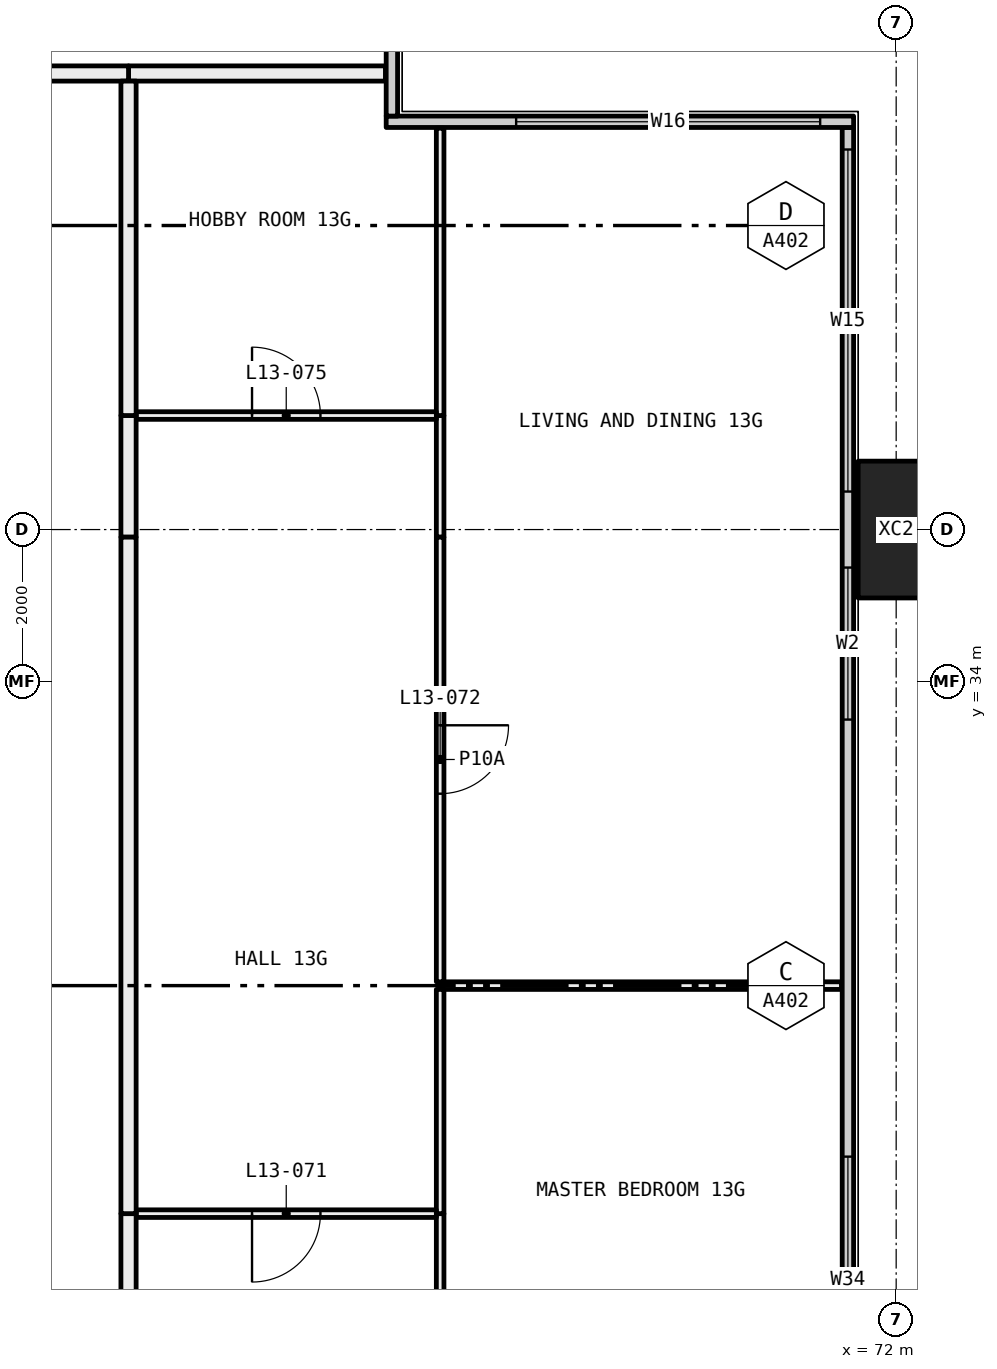
"""IFC4 building model, lengths in metres.
Left out: names, types, materials, properties, quantities, classifications, styles, units other than length and angle.
Written with IfcOpenShell. Run it as: python <this file> out.ifc"""

import sys

from ifc_helpers import new_model, si_unit, direction, frame, frame_2d, origin, origin_2d, place, context, subcontext, project, spatial, rectangle, hollow_rectangle, extrude, element, fill, save


model = new_model("IFC4")
c1 = context("Model", 3, precision=1e-05, world=origin(), true_north=direction((0.0, 1.0)))
c2 = subcontext(c1, "Body", "Model", "MODEL_VIEW")
j1 = project(units=[si_unit("LENGTHUNIT", "METRE"), si_unit("PLANEANGLEUNIT", "RADIAN")], contexts=[c1])
p1 = place(None, origin())
s1 = spatial("IfcSite", under=j1, at=p1, CompositionType="ELEMENT")
p2 = place(p1, origin())
s2 = spatial("IfcBuilding", under=s1, at=p2, CompositionType="ELEMENT")
p3 = place(p2, frame((0.0, 0.0, 57.6)))
s3 = spatial("IfcBuildingStorey", under=s2, at=p3, CompositionType="ELEMENT", Elevation=57.6)
p4 = place(p3, frame((72.0, 36.0, -0.4), z_axis=(0.0, 0.0, 1.0), x_axis=(0.0, 1.0, 0.0)))
e1 = element("IfcColumn", 1, at=p4, inside=s3, PredefinedType="COLUMN", context=c2, shape_type="SweptSolid", body=[
    extrude(hollow_rectangle(XDim=1.8, YDim=1.0, WallThickness=0.07, at=origin_2d()), origin(), (0.0, 0.0, 1.0), 3.45),
])
p5 = place(p3, frame((71.365, 6.71, 0.0), z_axis=(0.0, 0.0, 1.0), x_axis=(0.0, 1.0, 0.0)))
e2 = element("IfcWall", 2, at=p5, inside=s3, PredefinedType="ELEMENTEDWALL", context=c2, shape_type="SweptSolid", body=[
    extrude(rectangle(XDim=34.58, YDim=0.15, at=frame_2d((17.29, 0.0))), origin(), (0.0, 0.0, 1.0), 3.05),
])
p6 = place(p5, frame((0.29, 0.0, 0.45)))
e3 = element("IfcOpeningElement", 3, at=p6, cuts=e2, PredefinedType="OPENING", context=c2, shape_type="SweptSolid", body=[
    extrude(rectangle(XDim=4.5, YDim=2.55, at=frame_2d((2.25, 1.275))), frame((0.0, 0.085, 0.0), z_axis=(0.0, -1.0, 0.0), x_axis=(1.0, 0.0, 0.0)), (0.0, 0.0, 1.0), 0.17),
])
p7 = place(p5, frame((5.79, 0.0, 0.45)))
e4 = element("IfcOpeningElement", 4, at=p7, cuts=e2, PredefinedType="OPENING", context=c2, shape_type="SweptSolid", body=[
    extrude(rectangle(XDim=3.25, YDim=2.55, at=frame_2d((1.625, 1.275))), frame((0.0, 0.085, 0.0), z_axis=(0.0, -1.0, 0.0), x_axis=(1.0, 0.0, 0.0)), (0.0, 0.0, 1.0), 0.17),
])
p8 = place(p5, frame((13.54, 0.0, 0.45)))
e5 = element("IfcOpeningElement", 5, at=p8, cuts=e2, PredefinedType="OPENING", context=c2, shape_type="SweptSolid", body=[
    extrude(rectangle(XDim=3.25, YDim=2.55, at=frame_2d((1.625, 1.275))), frame((0.0, 0.085, 0.0), z_axis=(0.0, -1.0, 0.0), x_axis=(1.0, 0.0, 0.0)), (0.0, 0.0, 1.0), 0.17),
])
p9 = place(p5, frame((17.79, 0.0, 0.45)))
e6 = element("IfcOpeningElement", 6, at=p9, cuts=e2, PredefinedType="OPENING", context=c2, shape_type="SweptSolid", body=[
    extrude(rectangle(XDim=3.25, YDim=2.55, at=frame_2d((1.625, 1.275))), frame((0.0, 0.085, 0.0), z_axis=(0.0, -1.0, 0.0), x_axis=(1.0, 0.0, 0.0)), (0.0, 0.0, 1.0), 0.17),
])
p10 = place(p5, frame((26.79, 0.0, 0.45)))
e7 = element("IfcOpeningElement", 7, at=p10, cuts=e2, PredefinedType="OPENING", context=c2, shape_type="SweptSolid", body=[
    extrude(rectangle(XDim=2.0, YDim=2.55, at=frame_2d((1.0, 1.275))), frame((0.0, 0.085, 0.0), z_axis=(0.0, -1.0, 0.0), x_axis=(1.0, 0.0, 0.0)), (0.0, 0.0, 1.0), 0.17),
])
p11 = place(p5, frame((29.79, 0.0, 0.45)))
e8 = element("IfcOpeningElement", 8, at=p11, cuts=e2, PredefinedType="OPENING", context=c2, shape_type="SweptSolid", body=[
    extrude(rectangle(XDim=4.5, YDim=2.55, at=frame_2d((2.25, 1.275))), frame((0.0, 0.085, 0.0), z_axis=(0.0, -1.0, 0.0), x_axis=(1.0, 0.0, 0.0)), (0.0, 0.0, 1.0), 0.17),
])
p12 = place(p3, frame((65.29, 41.365, 0.0), z_axis=(0.0, 0.0, 1.0), x_axis=(1.0, 0.0, 0.0)))
e9 = element("IfcWall", 9, at=p12, inside=s3, PredefinedType="ELEMENTEDWALL", context=c2, shape_type="SweptSolid", body=[
    extrude(rectangle(XDim=6.15, YDim=0.15, at=frame_2d((3.075, 0.0))), origin(), (0.0, 0.0, 1.0), 3.05),
])
p13 = place(p12, frame((1.71, 0.0, 0.45)))
e10 = element("IfcOpeningElement", 10, at=p13, cuts=e9, PredefinedType="OPENING", context=c2, shape_type="SweptSolid", body=[
    extrude(rectangle(XDim=4.0, YDim=2.55, at=frame_2d((2.0, 1.275))), frame((0.0, 0.085, 0.0), z_axis=(0.0, -1.0, 0.0), x_axis=(1.0, 0.0, 0.0)), (0.0, 0.0, 1.0), 0.17),
])
p14 = place(p3, frame((65.365, 41.44, 0.0), z_axis=(0.0, 0.0, 1.0), x_axis=(0.0, 1.0, 0.0)))
e11 = element("IfcWall", 11, at=p14, inside=s3, PredefinedType="ELEMENTEDWALL", context=c2, shape_type="SweptSolid", body=[
    extrude(rectangle(XDim=5.85, YDim=0.15, at=frame_2d((2.925, 0.0))), origin(), (0.0, 0.0, 1.0), 3.05),
])
p15 = place(p14, frame((1.56, 0.0, 0.45)))
e12 = element("IfcOpeningElement", 12, at=p15, cuts=e11, PredefinedType="OPENING", context=c2, shape_type="SweptSolid", body=[
    extrude(rectangle(XDim=4.0, YDim=2.55, at=frame_2d((2.0, 1.275))), frame((0.0, 0.085, 0.0), z_axis=(0.0, -1.0, 0.0), x_axis=(1.0, 0.0, 0.0)), (0.0, 0.0, 1.0), 0.17),
])
p16 = place(p3, frame((61.9, 42.0, 0.0), z_axis=(0.0, 0.0, 1.0), x_axis=(1.0, 0.0, 0.0)))
e13 = element("IfcWall", 13, at=p16, inside=s3, PredefinedType="PARTITIONING", context=c2, shape_type="SweptSolid", body=[
    extrude(rectangle(XDim=3.38, YDim=0.2, at=frame_2d((1.69, 0.0))), origin(), (0.0, 0.0, 1.0), 3.05),
])
p17 = place(p3, frame((60.0, 42.0, 0.0), z_axis=(0.0, 0.0, 1.0), x_axis=(1.0, 0.0, 0.0)))
e14 = element("IfcWall", 14, at=p17, inside=s3, PredefinedType="PARTITIONING", context=c2, shape_type="SweptSolid", body=[
    extrude(rectangle(XDim=1.9, YDim=0.2, at=frame_2d((0.95, 0.0))), origin(), (0.0, 0.0, 1.0), 3.05),
])
p18 = place(p3, frame((71.28, 30.0, 0.0), z_axis=(0.0, 0.0, 1.0), x_axis=(-1.0, 0.0, 0.0)))
e15 = element("IfcWall", 15, at=p18, inside=s3, PredefinedType="PARTITIONING", context=c2, shape_type="SweptSolid", body=[
    extrude(rectangle(XDim=5.28, YDim=0.1, at=frame_2d((2.64, 0.0))), origin(), (0.0, 0.0, 1.0), 3.05),
])
p19 = place(p3, frame((66.0, 27.0, 0.0), z_axis=(0.0, 0.0, 1.0), x_axis=(0.0, -1.0, 0.0)))
e16 = element("IfcWall", 16, at=p19, inside=s3, PredefinedType="PARTITIONING", context=c2, shape_type="SweptSolid", body=[
    extrude(rectangle(XDim=2.95, YDim=0.1, at=frame_2d((1.475, 0.0))), origin(), (0.0, 0.0, 1.0), 2.45),
])
p20 = place(p3, frame((66.0, 29.95, 0.0), z_axis=(0.0, 0.0, 1.0), x_axis=(0.0, -1.0, 0.0)))
e17 = element("IfcWall", 17, at=p20, inside=s3, PredefinedType="PARTITIONING", context=c2, shape_type="SweptSolid", body=[
    extrude(rectangle(XDim=2.95, YDim=0.1, at=frame_2d((1.475, 0.0))), origin(), (0.0, 0.0, 1.0), 3.05),
])
p21 = place(p3, frame((66.0, 37.5, 0.0), z_axis=(0.0, 0.0, 1.0), x_axis=(0.0, -1.0, 0.0)))
e18 = element("IfcWall", 18, at=p21, inside=s3, PredefinedType="PARTITIONING", context=c2, shape_type="SweptSolid", body=[
    extrude(rectangle(XDim=1.6, YDim=0.1, at=frame_2d((0.8, 0.0))), origin(), (0.0, 0.0, 1.0), 2.45),
])
p22 = place(p3, frame((66.0, 35.9, 0.0), z_axis=(0.0, 0.0, 1.0), x_axis=(0.0, -1.0, 0.0)))
e19 = element("IfcWall", 19, at=p22, inside=s3, PredefinedType="PARTITIONING", context=c2, shape_type="SweptSolid", body=[
    extrude(rectangle(XDim=5.85, YDim=0.1, at=frame_2d((2.925, 0.0))), origin(), (0.0, 0.0, 1.0), 3.05),
])
p23 = place(p22, frame((2.475, 0.0, 0.0)))
e20 = element("IfcOpeningElement", 20, at=p23, cuts=e19, PredefinedType="OPENING", context=c2, shape_type="SweptSolid", body=[
    extrude(rectangle(XDim=0.9, YDim=2.1, at=frame_2d((0.45, 1.05))), frame((0.0, 0.06, 0.0), z_axis=(0.0, -1.0, 0.0), x_axis=(1.0, 0.0, 0.0)), (0.0, 0.0, 1.0), 0.12),
])
p24 = place(p3, frame((66.0, 41.28, 0.0), z_axis=(0.0, 0.0, 1.0), x_axis=(0.0, -1.0, 0.0)))
e21 = element("IfcWall", 21, at=p24, inside=s3, PredefinedType="PARTITIONING", context=c2, shape_type="SweptSolid", body=[
    extrude(rectangle(XDim=3.78, YDim=0.1, at=frame_2d((1.89, 0.0))), origin(), (0.0, 0.0, 1.0), 3.05),
])
p25 = place(p3, frame((65.95, 27.0, 0.0), z_axis=(0.0, 0.0, 1.0), x_axis=(-1.0, 0.0, 0.0)))
e22 = element("IfcWall", 22, at=p25, inside=s3, PredefinedType="PARTITIONING", context=c2, shape_type="SweptSolid", body=[
    extrude(rectangle(XDim=3.95, YDim=0.1, at=frame_2d((1.975, 0.0))), origin(), (0.0, 0.0, 1.0), 3.05),
])
p26 = place(p25, frame((1.525, 0.0, 0.0)))
e23 = element("IfcOpeningElement", 23, at=p26, cuts=e22, PredefinedType="OPENING", context=c2, shape_type="SweptSolid", body=[
    extrude(rectangle(XDim=0.9, YDim=2.1, at=frame_2d((0.45, 1.05))), frame((0.0, 0.06, 0.0), z_axis=(0.0, -1.0, 0.0), x_axis=(1.0, 0.0, 0.0)), (0.0, 0.0, 1.0), 0.12),
])
p27 = place(p3, frame((61.9, 27.0, 0.0), z_axis=(0.0, 0.0, 1.0), x_axis=(0.0, -1.0, 0.0)))
e24 = element("IfcWall", 24, at=p27, inside=s3, PredefinedType="PARTITIONING", context=c2, shape_type="SweptSolid", body=[
    extrude(rectangle(XDim=3.1, YDim=0.2, at=frame_2d((1.55, 0.0))), origin(), (0.0, 0.0, 1.0), 2.45),
])
p28 = place(p27, frame((1.05, 0.0, 0.0)))
e25 = element("IfcOpeningElement", 25, at=p28, cuts=e24, PredefinedType="OPENING", context=c2, shape_type="SweptSolid", body=[
    extrude(rectangle(XDim=1.0, YDim=2.1, at=frame_2d((0.5, 1.05))), frame((0.0, 0.11, 0.0), z_axis=(0.0, -1.0, 0.0), x_axis=(1.0, 0.0, 0.0)), (0.0, 0.0, 1.0), 0.22),
])
p29 = place(p3, frame((65.95, 37.5, 0.0), z_axis=(0.0, 0.0, 1.0), x_axis=(-1.0, 0.0, 0.0)))
e26 = element("IfcWall", 26, at=p29, inside=s3, PredefinedType="PARTITIONING", context=c2, shape_type="SweptSolid", body=[
    extrude(rectangle(XDim=3.95, YDim=0.1, at=frame_2d((1.975, 0.0))), origin(), (0.0, 0.0, 1.0), 3.05),
])
p30 = place(p29, frame((1.525, 0.0, 0.0)))
e27 = element("IfcOpeningElement", 27, at=p30, cuts=e26, PredefinedType="OPENING", context=c2, shape_type="SweptSolid", body=[
    extrude(rectangle(XDim=0.9, YDim=2.1, at=frame_2d((0.45, 1.05))), frame((0.0, 0.06, 0.0), z_axis=(0.0, -1.0, 0.0), x_axis=(1.0, 0.0, 0.0)), (0.0, 0.0, 1.0), 0.12),
])
p31 = place(p3, frame((61.9, 37.5, 0.0), z_axis=(0.0, 0.0, 1.0), x_axis=(0.0, -1.0, 0.0)))
e28 = element("IfcWall", 28, at=p31, inside=s3, PredefinedType="PARTITIONING", context=c2, shape_type="SweptSolid", body=[
    extrude(rectangle(XDim=1.6, YDim=0.2, at=frame_2d((0.8, 0.0))), origin(), (0.0, 0.0, 1.0), 2.45),
])
p32 = place(p3, frame((61.9, 35.9, 0.0), z_axis=(0.0, 0.0, 1.0), x_axis=(0.0, -1.0, 0.0)))
e29 = element("IfcWall", 29, at=p32, inside=s3, PredefinedType="PARTITIONING", context=c2, shape_type="SweptSolid", body=[
    extrude(rectangle(XDim=8.9, YDim=0.2, at=frame_2d((4.45, 0.0))), origin(), (0.0, 0.0, 1.0), 3.05),
])
p33 = place(p3, frame((61.9, 41.9, 0.0), z_axis=(0.0, 0.0, 1.0), x_axis=(0.0, -1.0, 0.0)))
e30 = element("IfcWall", 30, at=p33, inside=s3, PredefinedType="PARTITIONING", context=c2, shape_type="SweptSolid", body=[
    extrude(rectangle(XDim=4.4, YDim=0.2, at=frame_2d((2.2, 0.0))), origin(), (0.0, 0.0, 1.0), 3.05),
])
p34 = place(p9, origin())
e31 = element("IfcWindow", 31, at=p34, inside=s3, PartitioningType="SINGLE_PANEL", PredefinedType="WINDOW", context=c2, shape_type="SweptSolid", body=[
    extrude(rectangle(XDim=3.25, YDim=2.55, at=frame_2d((1.625, 1.275))), frame((0.0, 0.03, 0.0), z_axis=(0.0, -1.0, 0.0), x_axis=(1.0, 0.0, 0.0)), (0.0, 0.0, 1.0), 0.06),
])
fill(e6, e31)
p35 = place(p10, origin())
e32 = element("IfcWindow", 32, at=p35, inside=s3, PartitioningType="SINGLE_PANEL", PredefinedType="WINDOW", context=c2, shape_type="SweptSolid", body=[
    extrude(rectangle(XDim=2.0, YDim=2.55, at=frame_2d((1.0, 1.275))), frame((0.0, 0.03, 0.0), z_axis=(0.0, -1.0, 0.0), x_axis=(1.0, 0.0, 0.0)), (0.0, 0.0, 1.0), 0.06),
])
fill(e7, e32)
p36 = place(p11, origin())
e33 = element("IfcWindow", 33, at=p36, inside=s3, PartitioningType="SINGLE_PANEL", PredefinedType="WINDOW", context=c2, shape_type="SweptSolid", body=[
    extrude(rectangle(XDim=4.5, YDim=2.55, at=frame_2d((2.25, 1.275))), frame((0.0, 0.03, 0.0), z_axis=(0.0, -1.0, 0.0), x_axis=(1.0, 0.0, 0.0)), (0.0, 0.0, 1.0), 0.06),
])
fill(e8, e33)
p37 = place(p13, origin())
e34 = element("IfcWindow", 34, at=p37, inside=s3, PartitioningType="SINGLE_PANEL", PredefinedType="WINDOW", context=c2, shape_type="SweptSolid", body=[
    extrude(rectangle(XDim=4.0, YDim=2.55, at=frame_2d((2.0, 1.275))), frame((0.0, 0.03, 0.0), z_axis=(0.0, -1.0, 0.0), x_axis=(1.0, 0.0, 0.0)), (0.0, 0.0, 1.0), 0.06),
])
fill(e10, e34)
p38 = place(p26, origin())
e35 = element("IfcDoor", 35, at=p38, inside=s3, OperationType="SINGLE_SWING_LEFT", PredefinedType="DOOR", context=c2, shape_type="SweptSolid", body=[
    extrude(rectangle(XDim=0.9, YDim=2.1, at=frame_2d((0.45, 1.05))), frame((0.0, 0.025, 0.0), z_axis=(0.0, -1.0, 0.0), x_axis=(1.0, 0.0, 0.0)), (0.0, 0.0, 1.0), 0.05),
])
fill(e23, e35)
p39 = place(p23, origin())
e36 = element("IfcDoor", 36, at=p39, inside=s3, OperationType="SINGLE_SWING_RIGHT", PredefinedType="DOOR", context=c2, shape_type="SweptSolid", body=[
    extrude(rectangle(XDim=0.9, YDim=2.1, at=frame_2d((0.45, 1.05))), frame((0.0, 0.025, 0.0), z_axis=(0.0, -1.0, 0.0), x_axis=(1.0, 0.0, 0.0)), (0.0, 0.0, 1.0), 0.05),
])
fill(e20, e36)
p40 = place(p30, frame((0.9, 0.0, 0.0), x_axis=(-1.0, 0.0, 0.0)))
e37 = element("IfcDoor", 37, at=p40, inside=s3, OperationType="SINGLE_SWING_RIGHT", PredefinedType="DOOR", context=c2, shape_type="SweptSolid", body=[
    extrude(rectangle(XDim=0.9, YDim=2.1, at=frame_2d((0.45, 1.05))), frame((0.0, 0.025, 0.0), z_axis=(0.0, -1.0, 0.0), x_axis=(1.0, 0.0, 0.0)), (0.0, 0.0, 1.0), 0.05),
])
fill(e27, e37)
save(model, sys.argv[1])
